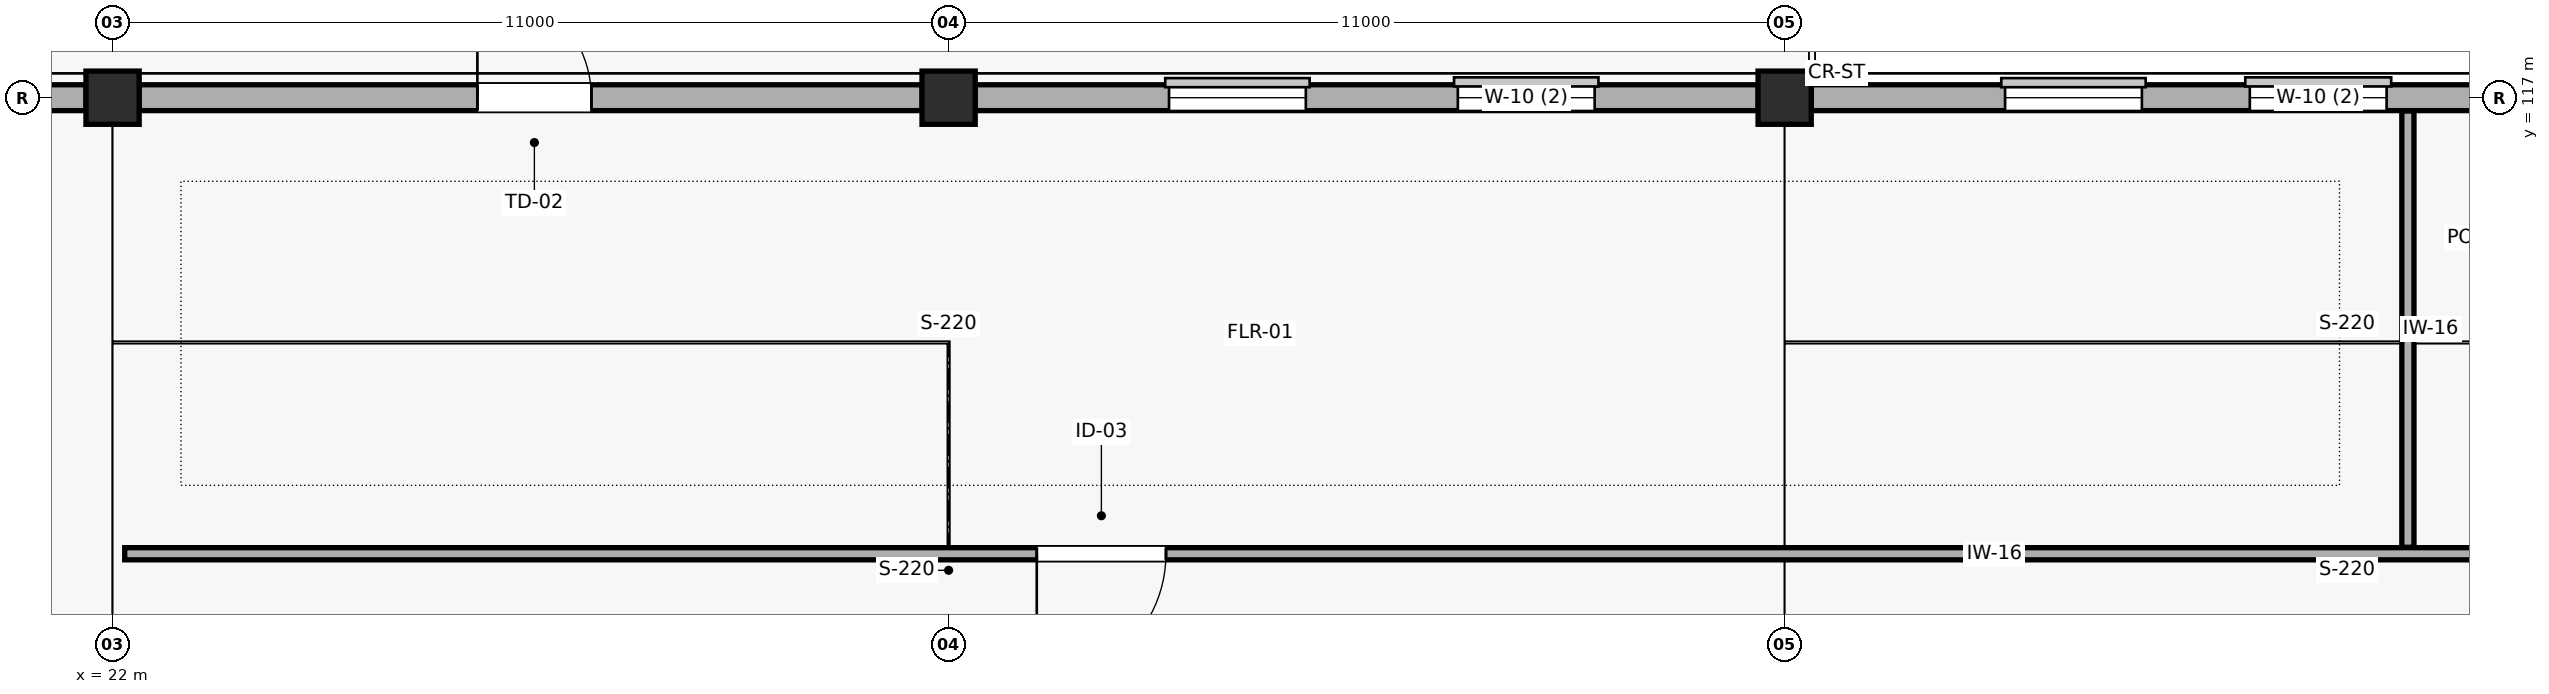
"""IFC4 building model, lengths in metres.
Left out: names, types, materials, properties, quantities, classifications, styles, units other than length and angle.
Written with IfcOpenShell. Run it as: python <this file> out.ifc"""

import sys

from ifc_helpers import new_model, si_unit, direction, frame, frame_2d, origin, origin_2d, place, context, subcontext, project, spatial, rectangle, extrude, element, fill, save


model = new_model("IFC4")
c1 = context("Model", 3, precision=1e-05, world=origin(), true_north=direction((0.0, 1.0)))
c2 = subcontext(c1, "Body", "Model", "MODEL_VIEW")
j1 = project(units=[si_unit("LENGTHUNIT", "METRE"), si_unit("PLANEANGLEUNIT", "RADIAN")], contexts=[c1])
p1 = place(None, origin())
s1 = spatial("IfcSite", under=j1, at=p1, CompositionType="ELEMENT")
p2 = place(p1, origin())
s2 = spatial("IfcBuilding", under=s1, at=p2, CompositionType="ELEMENT")
p3 = place(p2, frame((0.0, 0.0, 5.4)))
s3 = spatial("IfcBuildingStorey", under=s2, at=p3, CompositionType="ELEMENT", Elevation=5.4)
for number, where, z_axis, x_axis in (
    (1, (22.0, 117.0, 0.0), (0.0, 0.0, 1.0), (1.0, 0.0, 0.0)),
    (2, (33.0, 117.0, 0.0), (0.0, 0.0, 1.0), (1.0, 0.0, 0.0)),
    (3, (44.0, 117.0, 0.0), (0.0, 0.0, 1.0), (1.0, 0.0, 0.0)),
):
    element("IfcColumn", number, at=place(p3, frame(where, z_axis=z_axis, x_axis=x_axis)), inside=s3, PredefinedType="COLUMN", context=c2, shape_type="SweptSolid", body=[
        extrude(rectangle(XDim=0.7, YDim=0.7, at=origin_2d()), origin(), (0.0, 0.0, 1.0), 4.5),
    ])
p4 = place(p3, frame((21.652, 117.0, 0.0), z_axis=(0.0, 0.0, 1.0), x_axis=(-1.0, 0.0, 0.0)))
e4 = element("IfcWall", 4, at=p4, inside=s3, PredefinedType="SOLIDWALL", context=c2, shape_type="SweptSolid", body=[
    extrude(rectangle(XDim=10.304, YDim=0.34, at=frame_2d((5.152, 0.0))), origin(), (0.0, 0.0, 1.0), 3.625),
])
p5 = place(p4, frame((2.152, 0.0, 0.95)))
e5 = element("IfcOpeningElement", 5, at=p5, cuts=e4, PredefinedType="OPENING", context=c2, shape_type="SweptSolid", body=[
    extrude(rectangle(XDim=1.8, YDim=2.4, at=frame_2d((0.9, 1.2))), frame((0.0, 0.18, 0.0), z_axis=(0.0, -1.0, 0.0), x_axis=(1.0, 0.0, 0.0)), (0.0, 0.0, 1.0), 0.36),
])
p6 = place(p4, frame((5.952, 0.0, 0.95)))
e6 = element("IfcOpeningElement", 6, at=p6, cuts=e4, PredefinedType="OPENING", context=c2, shape_type="SweptSolid", body=[
    extrude(rectangle(XDim=1.8, YDim=2.4, at=frame_2d((0.9, 1.2))), frame((0.0, 0.18, 0.0), z_axis=(0.0, -1.0, 0.0), x_axis=(1.0, 0.0, 0.0)), (0.0, 0.0, 1.0), 0.36),
])
p7 = place(p3, frame((32.652, 117.0, 0.0), z_axis=(0.0, 0.0, 1.0), x_axis=(-1.0, 0.0, 0.0)))
e7 = element("IfcWall", 7, at=p7, inside=s3, PredefinedType="SOLIDWALL", context=c2, shape_type="SweptSolid", body=[
    extrude(rectangle(XDim=10.304, YDim=0.34, at=frame_2d((5.152, 0.0))), origin(), (0.0, 0.0, 1.0), 3.625),
])
p8 = place(p7, frame((4.352, 0.0, 0.0)))
e8 = element("IfcOpeningElement", 8, at=p8, cuts=e7, PredefinedType="OPENING", context=c2, shape_type="SweptSolid", body=[
    extrude(rectangle(XDim=1.5, YDim=2.25, at=frame_2d((0.75, 1.125))), frame((0.0, 0.18, 0.0), z_axis=(0.0, -1.0, 0.0), x_axis=(1.0, 0.0, 0.0)), (0.0, 0.0, 1.0), 0.36),
])
p9 = place(p3, frame((43.652, 117.0, 0.0), z_axis=(0.0, 0.0, 1.0), x_axis=(-1.0, 0.0, 0.0)))
e9 = element("IfcWall", 9, at=p9, inside=s3, PredefinedType="SOLIDWALL", context=c2, shape_type="SweptSolid", body=[
    extrude(rectangle(XDim=10.304, YDim=0.34, at=frame_2d((5.152, 0.0))), origin(), (0.0, 0.0, 1.0), 3.625),
])
p10 = place(p9, frame((2.152, 0.0, 0.95)))
e10 = element("IfcOpeningElement", 10, at=p10, cuts=e9, PredefinedType="OPENING", context=c2, shape_type="SweptSolid", body=[
    extrude(rectangle(XDim=1.8, YDim=2.4, at=frame_2d((0.9, 1.2))), frame((0.0, 0.18, 0.0), z_axis=(0.0, -1.0, 0.0), x_axis=(1.0, 0.0, 0.0)), (0.0, 0.0, 1.0), 0.36),
])
p11 = place(p9, frame((5.952, 0.0, 0.95)))
e11 = element("IfcOpeningElement", 11, at=p11, cuts=e9, PredefinedType="OPENING", context=c2, shape_type="SweptSolid", body=[
    extrude(rectangle(XDim=1.8, YDim=2.4, at=frame_2d((0.9, 1.2))), frame((0.0, 0.18, 0.0), z_axis=(0.0, -1.0, 0.0), x_axis=(1.0, 0.0, 0.0)), (0.0, 0.0, 1.0), 0.36),
])
p12 = place(p3, frame((54.652, 117.0, 0.0), z_axis=(0.0, 0.0, 1.0), x_axis=(-1.0, 0.0, 0.0)))
e12 = element("IfcWall", 12, at=p12, inside=s3, PredefinedType="SOLIDWALL", context=c2, shape_type="SweptSolid", body=[
    extrude(rectangle(XDim=10.304, YDim=0.34, at=frame_2d((5.152, 0.0))), origin(), (0.0, 0.0, 1.0), 3.625),
])
p13 = place(p12, frame((2.732, 0.0, 0.95)))
e13 = element("IfcOpeningElement", 13, at=p13, cuts=e12, PredefinedType="OPENING", context=c2, shape_type="SweptSolid", body=[
    extrude(rectangle(XDim=1.8, YDim=2.4, at=frame_2d((0.9, 1.2))), frame((0.0, 0.18, 0.0), z_axis=(0.0, -1.0, 0.0), x_axis=(1.0, 0.0, 0.0)), (0.0, 0.0, 1.0), 0.36),
])
p14 = place(p12, frame((5.952, 0.0, 0.95)))
e14 = element("IfcOpeningElement", 14, at=p14, cuts=e12, PredefinedType="OPENING", context=c2, shape_type="SweptSolid", body=[
    extrude(rectangle(XDim=1.8, YDim=2.4, at=frame_2d((0.9, 1.2))), frame((0.0, 0.18, 0.0), z_axis=(0.0, -1.0, 0.0), x_axis=(1.0, 0.0, 0.0)), (0.0, 0.0, 1.0), 0.36),
])
p15 = place(p3, frame((22.16, 111.0, 0.0), z_axis=(0.0, 0.0, 1.0), x_axis=(1.0, 0.0, 0.0)))
e15 = element("IfcWall", 15, at=p15, inside=s3, PredefinedType="PARTITIONING", context=c2, shape_type="SweptSolid", body=[
    extrude(rectangle(XDim=43.68, YDim=0.16, at=frame_2d((21.84, 0.0))), origin(), (0.0, 0.0, 1.0), 3.725),
])
p16 = place(p15, frame((12.0, 0.0, 0.0)))
e16 = element("IfcOpeningElement", 16, at=p16, cuts=e15, PredefinedType="OPENING", context=c2, shape_type="SweptSolid", body=[
    extrude(rectangle(XDim=1.7, YDim=2.35, at=frame_2d((0.85, 1.175))), frame((0.0, 0.09, 0.0), z_axis=(0.0, -1.0, 0.0), x_axis=(1.0, 0.0, 0.0)), (0.0, 0.0, 1.0), 0.18),
])
p17 = place(p15, frame((35.5, 0.0, 0.0)))
e17 = element("IfcOpeningElement", 17, at=p17, cuts=e15, PredefinedType="OPENING", context=c2, shape_type="SweptSolid", body=[
    extrude(rectangle(XDim=1.02, YDim=2.15, at=frame_2d((0.51, 1.075))), frame((0.0, 0.09, 0.0), z_axis=(0.0, -1.0, 0.0), x_axis=(1.0, 0.0, 0.0)), (0.0, 0.0, 1.0), 0.18),
])
p18 = place(p3, frame((52.2, 111.085, 0.0), z_axis=(0.0, 0.0, 1.0), x_axis=(0.0, 1.0, 0.0)))
e18 = element("IfcWall", 18, at=p18, inside=s3, PredefinedType="PARTITIONING", context=c2, shape_type="SweptSolid", body=[
    extrude(rectangle(XDim=5.74, YDim=0.16, at=frame_2d((2.87, 0.0))), origin(), (0.0, 0.0, 1.0), 3.625),
])
p19 = place(p8, frame((1.5, 0.0, 0.0), z_axis=(0.0, 0.0, 1.0), x_axis=(-1.0, 0.0, 0.0)))
e19 = element("IfcDoor", 19, at=p19, inside=s3, OperationType="SINGLE_SWING_LEFT", PredefinedType="DOOR", context=c2, shape_type="SweptSolid", body=[
    extrude(rectangle(XDim=1.5, YDim=2.25, at=frame_2d((0.75, 1.125))), frame((0.0, 0.025, 0.0), z_axis=(0.0, -1.0, 0.0), x_axis=(1.0, 0.0, 0.0)), (0.0, 0.0, 1.0), 0.05),
])
fill(e8, e19)
p20 = place(p10, origin())
e20 = element("IfcWindow", 20, at=p20, inside=s3, PartitioningType="SINGLE_PANEL", PredefinedType="WINDOW", context=c2, shape_type="SweptSolid", body=[
    extrude(rectangle(XDim=1.8, YDim=2.4, at=frame_2d((0.9, 1.2))), frame((0.0, 0.03, 0.0), z_axis=(0.0, -1.0, 0.0), x_axis=(1.0, 0.0, 0.0)), (0.0, 0.0, 1.0), 0.06),
])
fill(e10, e20)
p21 = place(p11, origin())
e21 = element("IfcWindow", 21, at=p21, inside=s3, PartitioningType="SINGLE_PANEL", PredefinedType="WINDOW", context=c2, shape_type="SweptSolid", body=[
    extrude(rectangle(XDim=1.8, YDim=2.4, at=frame_2d((0.9, 1.2))), frame((0.0, 0.03, 0.0), z_axis=(0.0, -1.0, 0.0), x_axis=(1.0, 0.0, 0.0)), (0.0, 0.0, 1.0), 0.06),
])
fill(e11, e21)
p22 = place(p13, origin())
e22 = element("IfcWindow", 22, at=p22, inside=s3, PartitioningType="SINGLE_PANEL", PredefinedType="WINDOW", context=c2, shape_type="SweptSolid", body=[
    extrude(rectangle(XDim=1.8, YDim=2.4, at=frame_2d((0.9, 1.2))), frame((0.0, 0.03, 0.0), z_axis=(0.0, -1.0, 0.0), x_axis=(1.0, 0.0, 0.0)), (0.0, 0.0, 1.0), 0.06),
])
fill(e13, e22)
p23 = place(p14, origin())
e23 = element("IfcWindow", 23, at=p23, inside=s3, PartitioningType="SINGLE_PANEL", PredefinedType="WINDOW", context=c2, shape_type="SweptSolid", body=[
    extrude(rectangle(XDim=1.8, YDim=2.4, at=frame_2d((0.9, 1.2))), frame((0.0, 0.03, 0.0), z_axis=(0.0, -1.0, 0.0), x_axis=(1.0, 0.0, 0.0)), (0.0, 0.0, 1.0), 0.06),
])
fill(e14, e23)
p24 = place(p16, frame((1.7, 0.0, 0.0), z_axis=(0.0, 0.0, 1.0), x_axis=(-1.0, 0.0, 0.0)))
e24 = element("IfcDoor", 24, at=p24, inside=s3, OperationType="SINGLE_SWING_RIGHT", PredefinedType="DOOR", context=c2, shape_type="SweptSolid", body=[
    extrude(rectangle(XDim=1.7, YDim=2.35, at=frame_2d((0.85, 1.175))), frame((0.0, 0.025, 0.0), z_axis=(0.0, -1.0, 0.0), x_axis=(1.0, 0.0, 0.0)), (0.0, 0.0, 1.0), 0.05),
])
fill(e16, e24)
save(model, sys.argv[1])
